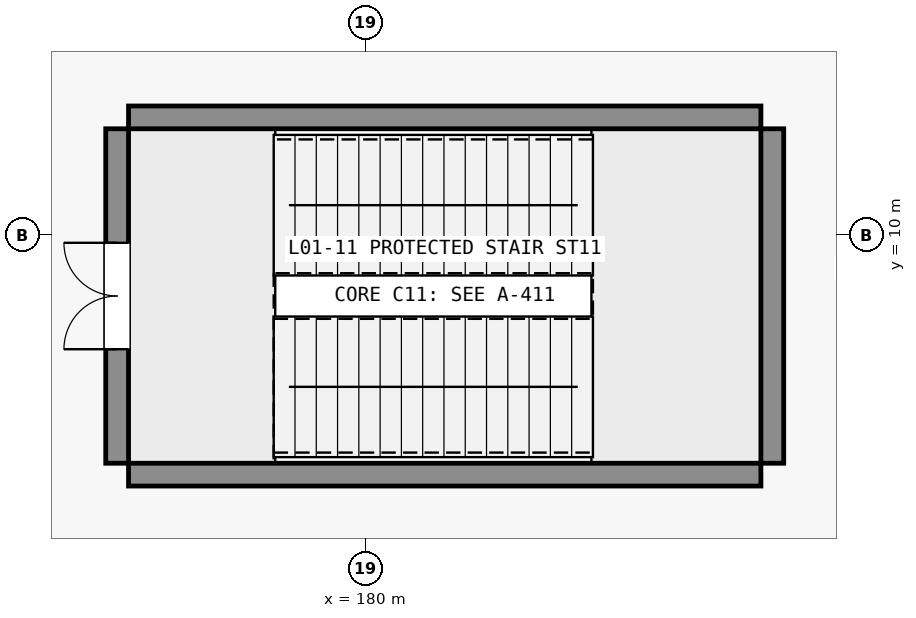
"""IFC4 building model, lengths in metres.
Left out: names, types, materials, properties, quantities, classifications, styles, units other than length and angle.
Written with IfcOpenShell. Run it as: python <this file> out.ifc"""

import sys

from ifc_helpers import new_model, si_unit, direction, frame, frame_2d, origin, place, context, subcontext, project, spatial, rectangle, extrude, element, fill, save


model = new_model("IFC4")
c1 = context("Model", 3, precision=1e-05, world=origin(), true_north=direction((0.0, 1.0)))
c2 = subcontext(c1, "Body", "Model", "MODEL_VIEW")
j1 = project(units=[si_unit("LENGTHUNIT", "METRE"), si_unit("PLANEANGLEUNIT", "RADIAN")], contexts=[c1])
p1 = place(None, origin())
s1 = spatial("IfcSite", under=j1, at=p1, CompositionType="ELEMENT")
p2 = place(p1, origin())
s2 = spatial("IfcBuilding", under=s1, at=p2, CompositionType="ELEMENT")
p3 = place(p2, frame((0.0, 0.0, 6.0)))
s3 = spatial("IfcBuildingStorey", under=s2, at=p3, CompositionType="ELEMENT", Elevation=6.0)
for number, where, z_axis, x_axis in (
    (1, (176.88, 6.85, 0.0), (0.0, 0.0, 1.0), (1.0, 0.0, 0.0)),
    (2, (176.88, 11.55, 0.0), (0.0, 0.0, 1.0), (1.0, 0.0, 0.0)),
):
    element("IfcWall", number, at=place(p3, frame(where, z_axis=z_axis, x_axis=x_axis)), inside=s3, PredefinedType="SHEAR", context=c2, shape_type="SweptSolid", body=[
        extrude(rectangle(XDim=8.32, YDim=0.3, at=frame_2d((4.16, 0.0))), origin(), (0.0, 0.0, 1.0), 5.4),
    ])
p4 = place(p3, frame((176.73, 7.0, 0.0), z_axis=(0.0, 0.0, 1.0), x_axis=(0.0, 1.0, 0.0)))
e3 = element("IfcWall", 3, at=p4, inside=s3, PredefinedType="SHEAR", context=c2, shape_type="SweptSolid", body=[
    extrude(rectangle(XDim=4.4, YDim=0.3, at=frame_2d((2.2, 0.0))), origin(), (0.0, 0.0, 1.0), 5.4),
])
p5 = place(p4, frame((1.5, 0.0, 0.0)))
e4 = element("IfcOpeningElement", 4, at=p5, cuts=e3, PredefinedType="OPENING", context=c2, shape_type="SweptSolid", body=[
    extrude(rectangle(XDim=1.4, YDim=2.2, at=frame_2d((0.7, 1.1))), frame((0.0, 0.16, 0.0), z_axis=(0.0, -1.0, 0.0), x_axis=(1.0, 0.0, 0.0)), (0.0, 0.0, 1.0), 0.32),
])
p6 = place(p3, frame((185.35, 7.0, 0.0), z_axis=(0.0, 0.0, 1.0), x_axis=(0.0, 1.0, 0.0)))
e5 = element("IfcWall", 5, at=p6, inside=s3, PredefinedType="SHEAR", context=c2, shape_type="SweptSolid", body=[
    extrude(rectangle(XDim=4.4, YDim=0.3, at=frame_2d((2.2, 0.0))), origin(), (0.0, 0.0, 1.0), 5.4),
])
p7 = place(p5, origin())
e6 = element("IfcDoor", 6, at=p7, inside=s3, OperationType="DOUBLE_DOOR_SINGLE_SWING", PredefinedType="DOOR", context=c2, shape_type="SweptSolid", body=[
    extrude(rectangle(XDim=1.4, YDim=2.2, at=frame_2d((0.7, 1.1))), frame((0.0, 0.025, 0.0), z_axis=(0.0, -1.0, 0.0), x_axis=(1.0, 0.0, 0.0)), (0.0, 0.0, 1.0), 0.05),
])
fill(e4, e6)
save(model, sys.argv[1])
